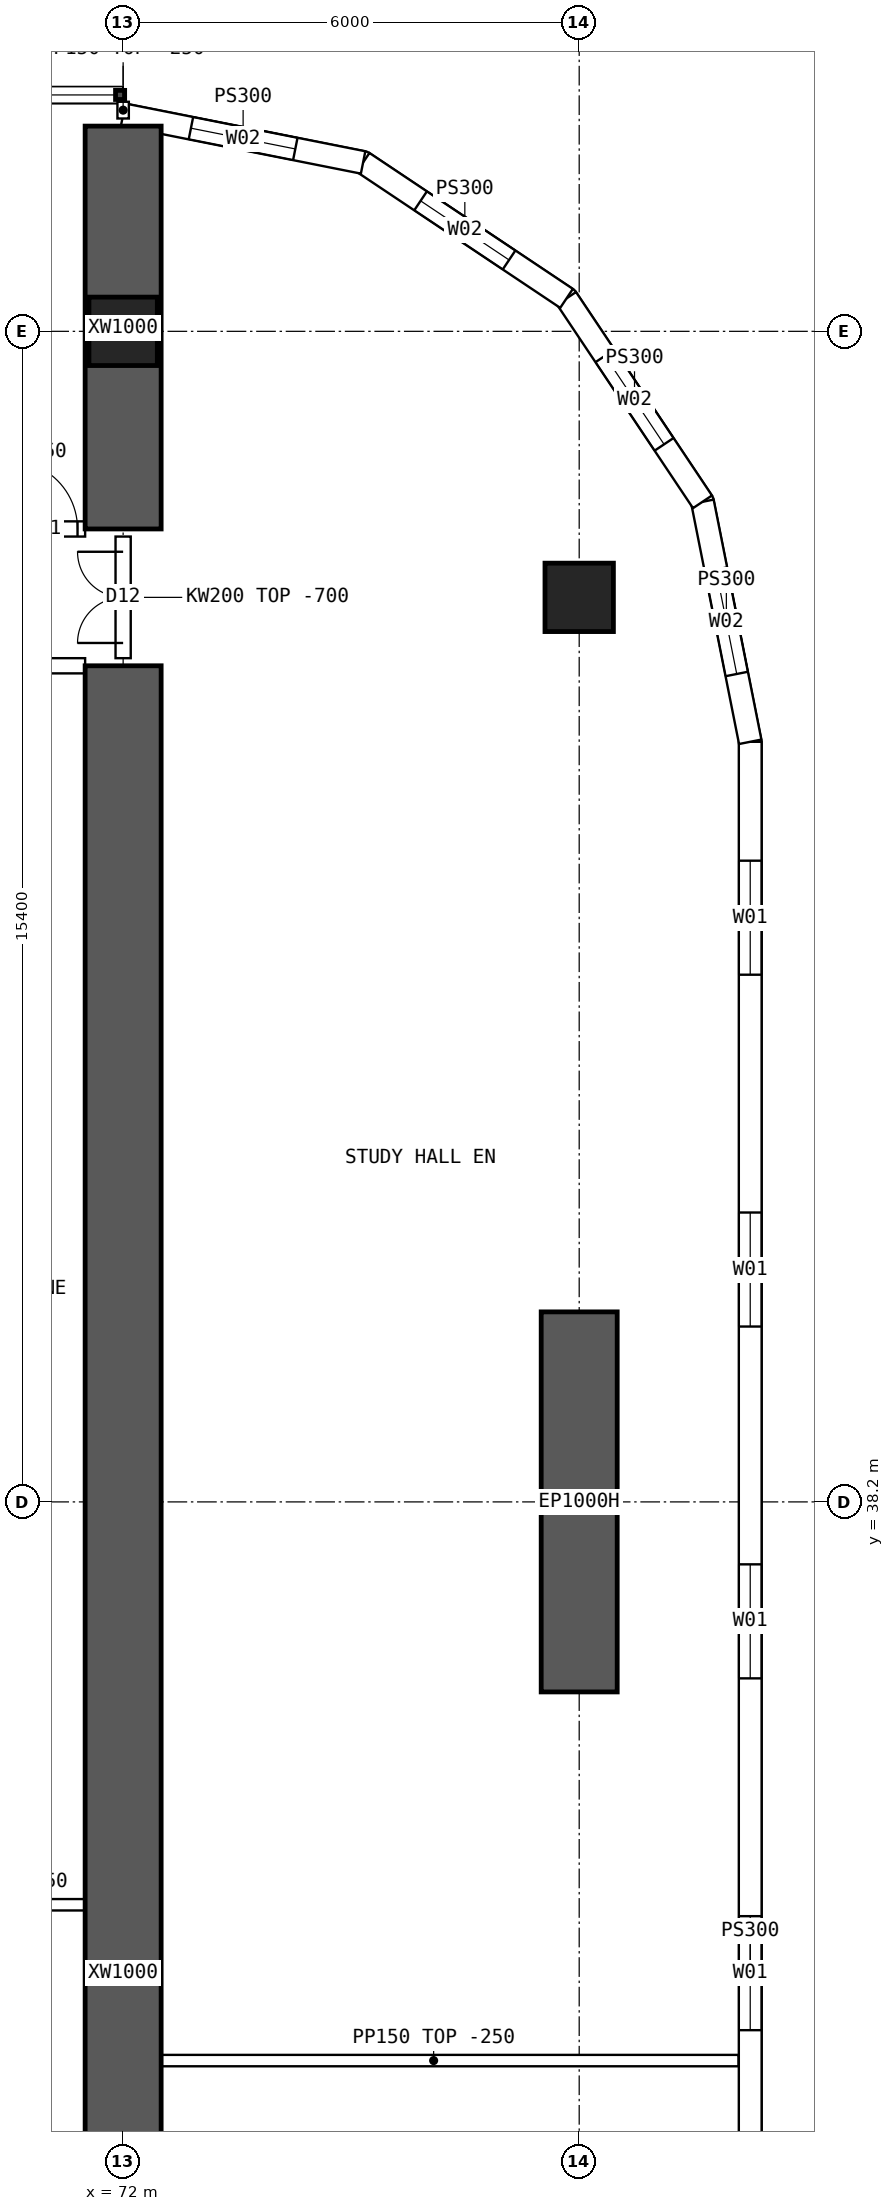
"""IFC4 building model, lengths in metres.
Left out: names, types, materials, properties, quantities, classifications, styles, units other than length and angle.
Written with IfcOpenShell. Run it as: python <this file> out.ifc"""

import sys

from ifc_helpers import new_model, si_unit, direction, frame, frame_2d, origin, origin_2d, place, context, subcontext, project, spatial, polyline, rectangle, hollow_rectangle, outline, extrude, element, fill, save


model = new_model("IFC4")
c1 = context("Model", 3, precision=1e-05, world=origin(), true_north=direction((0.0, 1.0)))
c2 = subcontext(c1, "Body", "Model", "MODEL_VIEW")
j1 = project(units=[si_unit("LENGTHUNIT", "METRE"), si_unit("PLANEANGLEUNIT", "RADIAN")], contexts=[c1])
p1 = place(None, origin())
s1 = spatial("IfcSite", under=j1, at=p1, CompositionType="ELEMENT")
p2 = place(p1, origin())
s2 = spatial("IfcBuilding", under=s1, at=p2, CompositionType="ELEMENT")
p3 = place(p2, frame((0.0, 0.0, 31.45)))
s3 = spatial("IfcBuildingStorey", under=s2, at=p3, CompositionType="ELEMENT", Elevation=31.45)
for number, where, z_axis, x_axis in (
    (1, (72.0, 53.6, 0.0), (0.0, 0.0, 1.0), (1.0, 0.0, 0.0)),
    (2, (78.0, 50.1, 0.0), (0.0, 0.0, 1.0), (1.0, 0.0, 0.0)),
):
    element("IfcColumn", number, at=place(p3, frame(where, z_axis=z_axis, x_axis=x_axis)), inside=s3, PredefinedType="COLUMN", context=c2, shape_type="SweptSolid", body=[
        extrude(hollow_rectangle(XDim=0.9, YDim=0.9, WallThickness=0.09, at=origin_2d()), origin(), (0.0, 0.0, 1.0), 3.75),
    ])
p4 = place(p3, frame((78.0, 35.7, 0.0), z_axis=(0.0, 0.0, 1.0), x_axis=(0.0, 1.0, 0.0)))
e3 = element("IfcWall", 3, at=p4, inside=s3, PredefinedType="SHEAR", context=c2, shape_type="SweptSolid", body=[
    extrude(rectangle(XDim=5.0, YDim=1.0, at=frame_2d((2.5, 0.0))), origin(), (0.0, 0.0, 1.0), 3.75),
])
p5 = place(p3, frame((72.0, 51.0, 0.0), z_axis=(0.0, 0.0, 1.0), x_axis=(0.0, 1.0, 0.0)))
e4 = element("IfcWall", 4, at=p5, inside=s3, PredefinedType="SHEAR", context=c2, shape_type="SweptSolid", body=[
    extrude(rectangle(XDim=5.3, YDim=1.0, at=frame_2d((2.65, 0.0))), origin(), (0.0, 0.0, 1.0), 3.75),
])
p6 = place(p3, frame((72.0, 14.8, 0.0), z_axis=(0.0, 0.0, 1.0), x_axis=(0.0, 1.0, 0.0)))
e5 = element("IfcWall", 5, at=p6, inside=s3, PredefinedType="SHEAR", context=c2, shape_type="SweptSolid", body=[
    extrude(rectangle(XDim=34.4, YDim=1.0, at=frame_2d((17.2, 0.0))), origin(), (0.0, 0.0, 1.0), 3.75),
])
p7 = place(p3, frame((80.25, 15.8, 0.0), z_axis=(0.0, 0.0, 1.0), x_axis=(0.0, 1.0, 0.0)))
e6 = element("IfcWall", 6, at=p7, inside=s3, PredefinedType="SOLIDWALL", context=c2, shape_type="SweptSolid", body=[
    extrude(outline(polyline([(-0.015, -0.15), (32.415, -0.15), (32.385, 0.15), (0.015, 0.15), (-0.015, -0.15)])), origin(), (0.0, 0.0, 1.0), 3.5),
])
p8 = place(p7, frame((1.564, 0.0, 0.9)))
e7 = element("IfcOpeningElement", 7, at=p8, cuts=e6, PredefinedType="OPENING", context=c2, shape_type="SweptSolid", body=[
    extrude(rectangle(XDim=1.5, YDim=2.0, at=frame_2d((0.75, 1.0))), frame((0.0, 0.16, 0.0), z_axis=(0.0, -1.0, 0.0), x_axis=(1.0, 0.0, 0.0)), (0.0, 0.0, 1.0), 0.32),
])
p9 = place(p7, frame((6.193, 0.0, 0.9)))
e8 = element("IfcOpeningElement", 8, at=p9, cuts=e6, PredefinedType="OPENING", context=c2, shape_type="SweptSolid", body=[
    extrude(rectangle(XDim=1.5, YDim=2.0, at=frame_2d((0.75, 1.0))), frame((0.0, 0.16, 0.0), z_axis=(0.0, -1.0, 0.0), x_axis=(1.0, 0.0, 0.0)), (0.0, 0.0, 1.0), 0.32),
])
p10 = place(p7, frame((10.822, 0.0, 0.9)))
e9 = element("IfcOpeningElement", 9, at=p10, cuts=e6, PredefinedType="OPENING", context=c2, shape_type="SweptSolid", body=[
    extrude(rectangle(XDim=1.5, YDim=2.0, at=frame_2d((0.75, 1.0))), frame((0.0, 0.16, 0.0), z_axis=(0.0, -1.0, 0.0), x_axis=(1.0, 0.0, 0.0)), (0.0, 0.0, 1.0), 0.32),
])
p11 = place(p7, frame((15.45, 0.0, 0.9)))
e10 = element("IfcOpeningElement", 10, at=p11, cuts=e6, PredefinedType="OPENING", context=c2, shape_type="SweptSolid", body=[
    extrude(rectangle(XDim=1.5, YDim=2.0, at=frame_2d((0.75, 1.0))), frame((0.0, 0.16, 0.0), z_axis=(0.0, -1.0, 0.0), x_axis=(1.0, 0.0, 0.0)), (0.0, 0.0, 1.0), 0.32),
])
p12 = place(p7, frame((20.079, 0.0, 0.9)))
e11 = element("IfcOpeningElement", 11, at=p12, cuts=e6, PredefinedType="OPENING", context=c2, shape_type="SweptSolid", body=[
    extrude(rectangle(XDim=1.5, YDim=2.0, at=frame_2d((0.75, 1.0))), frame((0.0, 0.16, 0.0), z_axis=(0.0, -1.0, 0.0), x_axis=(1.0, 0.0, 0.0)), (0.0, 0.0, 1.0), 0.32),
])
p13 = place(p7, frame((24.707, 0.0, 0.9)))
e12 = element("IfcOpeningElement", 12, at=p13, cuts=e6, PredefinedType="OPENING", context=c2, shape_type="SweptSolid", body=[
    extrude(rectangle(XDim=1.5, YDim=2.0, at=frame_2d((0.75, 1.0))), frame((0.0, 0.16, 0.0), z_axis=(0.0, -1.0, 0.0), x_axis=(1.0, 0.0, 0.0)), (0.0, 0.0, 1.0), 0.32),
])
p14 = place(p7, frame((29.336, 0.0, 0.9)))
e13 = element("IfcOpeningElement", 13, at=p14, cuts=e6, PredefinedType="OPENING", context=c2, shape_type="SweptSolid", body=[
    extrude(rectangle(XDim=1.5, YDim=2.0, at=frame_2d((0.75, 1.0))), frame((0.0, 0.16, 0.0), z_axis=(0.0, -1.0, 0.0), x_axis=(1.0, 0.0, 0.0)), (0.0, 0.0, 1.0), 0.32),
])
p15 = place(p3, frame((80.25, 48.2, 0.0), z_axis=(0.0, 0.0, 1.0), x_axis=(-0.195065901187, 0.980790137692, 0.0)))
e14 = element("IfcWall", 14, at=p15, inside=s3, PredefinedType="SOLIDWALL", context=c2, shape_type="SweptSolid", body=[
    extrude(outline(polyline([(-0.015, -0.15), (3.249, -0.15), (3.189, 0.15), (0.015, 0.15), (-0.015, -0.15)])), origin(), (0.0, 0.0, 1.0), 3.5),
])
p16 = place(p15, frame((0.909, 0.0, 0.9)))
e15 = element("IfcOpeningElement", 15, at=p16, cuts=e14, PredefinedType="OPENING", context=c2, shape_type="SweptSolid", body=[
    extrude(rectangle(XDim=1.4, YDim=1.8, at=frame_2d((0.7, 0.9))), frame((0.0, 0.16, 0.0), z_axis=(0.0, -1.0, 0.0), x_axis=(1.0, 0.0, 0.0)), (0.0, 0.0, 1.0), 0.32),
])
p17 = place(p3, frame((79.622, 51.357, 0.0), z_axis=(0.0, 0.0, 1.0), x_axis=(-0.555609954424, 0.831443069936, 0.0)))
e16 = element("IfcWall", 16, at=p17, inside=s3, PredefinedType="SOLIDWALL", context=c2, shape_type="SweptSolid", body=[
    extrude(outline(polyline([(-0.03, -0.15), (3.249, -0.15), (3.189, 0.15), (0.03, 0.15), (-0.03, -0.15)])), origin(), (0.0, 0.0, 1.0), 3.5),
])
p18 = place(p17, frame((0.909, 0.0, 0.9)))
e17 = element("IfcOpeningElement", 17, at=p18, cuts=e16, PredefinedType="OPENING", context=c2, shape_type="SweptSolid", body=[
    extrude(rectangle(XDim=1.4, YDim=1.8, at=frame_2d((0.7, 0.9))), frame((0.0, 0.16, 0.0), z_axis=(0.0, -1.0, 0.0), x_axis=(1.0, 0.0, 0.0)), (0.0, 0.0, 1.0), 0.32),
])
p19 = place(p3, frame((77.833, 54.034, 0.0), z_axis=(0.0, 0.0, 1.0), x_axis=(-0.831478105043, 0.555557522525, 0.0)))
e18 = element("IfcWall", 18, at=p19, inside=s3, PredefinedType="SOLIDWALL", context=c2, shape_type="SweptSolid", body=[
    extrude(outline(polyline([(-0.03, -0.15), (3.249, -0.15), (3.189, 0.15), (0.03, 0.15), (-0.03, -0.15)])), origin(), (0.0, 0.0, 1.0), 3.5),
])
p20 = place(p19, frame((0.909, 0.0, 0.9)))
e19 = element("IfcOpeningElement", 19, at=p20, cuts=e18, PredefinedType="OPENING", context=c2, shape_type="SweptSolid", body=[
    extrude(rectangle(XDim=1.4, YDim=1.8, at=frame_2d((0.7, 0.9))), frame((0.0, 0.16, 0.0), z_axis=(0.0, -1.0, 0.0), x_axis=(1.0, 0.0, 0.0)), (0.0, 0.0, 1.0), 0.32),
])
p21 = place(p3, frame((75.157, 55.822, 0.0), z_axis=(0.0, 0.0, 1.0), x_axis=(-0.980787251524, 0.195080412259, 0.0)))
e20 = element("IfcWall", 20, at=p21, inside=s3, PredefinedType="SOLIDWALL", context=c2, shape_type="SweptSolid", body=[
    extrude(outline(polyline([(-0.03, -0.15), (3.249, -0.15), (3.189, 0.15), (0.03, 0.15), (-0.03, -0.15)])), origin(), (0.0, 0.0, 1.0), 3.5),
])
p22 = place(p21, frame((0.909, 0.0, 0.9)))
e21 = element("IfcOpeningElement", 21, at=p22, cuts=e20, PredefinedType="OPENING", context=c2, shape_type="SweptSolid", body=[
    extrude(rectangle(XDim=1.4, YDim=1.8, at=frame_2d((0.7, 0.9))), frame((0.0, 0.16, 0.0), z_axis=(0.0, -1.0, 0.0), x_axis=(1.0, 0.0, 0.0)), (0.0, 0.0, 1.0), 0.32),
])
p23 = place(p3, frame((66.5, 51.0, 0.0), z_axis=(0.0, 0.0, 1.0), x_axis=(1.0, 0.0, 0.0)))
e22 = element("IfcWall", 22, at=p23, inside=s3, PredefinedType="SOLIDWALL", context=c2, shape_type="SweptSolid", body=[
    extrude(outline(polyline([(0.0, 0.0), (5.0, 0.0), (5.0, 3.1), (0.0, 3.1), (0.0, 0.0)])), frame((0.0, 0.1, 0.0), z_axis=(0.0, -1.0, 0.0), x_axis=(1.0, 0.0, 0.0)), (0.0, 0.0, 1.0), 0.2),
])
p24 = place(p23, frame((0.1, 0.0, 0.0)))
e23 = element("IfcOpeningElement", 23, at=p24, cuts=e22, PredefinedType="OPENING", context=c2, shape_type="SweptSolid", body=[
    extrude(rectangle(XDim=0.9, YDim=2.1, at=frame_2d((0.45, 1.05))), frame((0.0, 0.11, 0.0), z_axis=(0.0, -1.0, 0.0), x_axis=(1.0, 0.0, 0.0)), (0.0, 0.0, 1.0), 0.22),
])
p25 = place(p23, frame((4.0, 0.0, 0.0)))
e24 = element("IfcOpeningElement", 24, at=p25, cuts=e22, PredefinedType="OPENING", context=c2, shape_type="SweptSolid", body=[
    extrude(rectangle(XDim=0.9, YDim=2.1, at=frame_2d((0.45, 1.05))), frame((0.0, 0.11, 0.0), z_axis=(0.0, -1.0, 0.0), x_axis=(1.0, 0.0, 0.0)), (0.0, 0.0, 1.0), 0.22),
])
p26 = place(p3, frame((66.5, 49.2, 0.0), z_axis=(0.0, 0.0, 1.0), x_axis=(1.0, 0.0, 0.0)))
e25 = element("IfcWall", 25, at=p26, inside=s3, PredefinedType="SOLIDWALL", context=c2, shape_type="SweptSolid", body=[
    extrude(rectangle(XDim=5.0, YDim=0.2, at=frame_2d((2.5, 0.0))), origin(), (0.0, 0.0, 1.0), 3.5),
])
p27 = place(p26, frame((0.2, 0.0, 0.0)))
e26 = element("IfcOpeningElement", 26, at=p27, cuts=e25, PredefinedType="OPENING", context=c2, shape_type="SweptSolid", body=[
    extrude(rectangle(XDim=1.6, YDim=2.1, at=frame_2d((0.8, 1.05))), frame((0.0, 0.11, 0.0), z_axis=(0.0, -1.0, 0.0), x_axis=(1.0, 0.0, 0.0)), (0.0, 0.0, 1.0), 0.22),
])
p28 = place(p3, frame((68.4, 32.9, 0.0), z_axis=(0.0, 0.0, 1.0), x_axis=(1.0, 0.0, 0.0)))
e27 = element("IfcWall", 27, at=p28, inside=s3, PredefinedType="PARTITIONING", context=c2, shape_type="SweptSolid", body=[
    extrude(rectangle(XDim=3.6, YDim=0.15, at=frame_2d((1.8, 0.0))), origin(), (0.0, 0.0, 1.0), 3.5),
])
p29 = place(p3, frame((72.075, 30.85, 0.0), z_axis=(0.0, 0.0, 1.0), x_axis=(1.0, 0.0, 0.0)))
e28 = element("IfcWall", 28, at=p29, inside=s3, PredefinedType="PARTITIONING", context=c2, shape_type="SweptSolid", body=[
    extrude(outline(polyline([(0.0, 0.0), (8.02, 0.0), (8.02, 3.5), (6.227, 3.5), (6.225, 3.05), (5.627, 3.05), (5.625, 3.5), (0.0, 3.5), (0.0, 0.0)])), frame((0.0, 0.075, 0.0), z_axis=(0.0, -1.0, 0.0), x_axis=(1.0, 0.0, 0.0)), (0.0, 0.0, 1.0), 0.15),
])
p30 = place(p3, frame((72.0, 49.3, 0.0), z_axis=(0.0, 0.0, 1.0), x_axis=(0.0, 1.0, 0.0)))
e29 = element("IfcWall", 29, at=p30, inside=s3, PredefinedType="SOLIDWALL", context=c2, shape_type="SweptSolid", body=[
    extrude(outline(polyline([(0.0, 0.0), (1.6, 0.0), (1.6, 3.05), (0.0, 3.05), (0.0, 0.0)])), frame((0.0, 0.1, 0.0), z_axis=(0.0, -1.0, 0.0), x_axis=(1.0, 0.0, 0.0)), (0.0, 0.0, 1.0), 0.2),
])
p31 = place(p30, frame((0.2, 0.0, 0.0)))
e30 = element("IfcOpeningElement", 30, at=p31, cuts=e29, PredefinedType="OPENING", context=c2, shape_type="SweptSolid", body=[
    extrude(rectangle(XDim=1.2, YDim=2.1, at=frame_2d((0.6, 1.05))), frame((0.0, 0.11, 0.0), z_axis=(0.0, -1.0, 0.0), x_axis=(1.0, 0.0, 0.0)), (0.0, 0.0, 1.0), 0.22),
])
p32 = place(p3, frame((72.0, 56.4, 0.0), z_axis=(0.0, 0.0, 1.0), x_axis=(0.0, 1.0, 0.0)))
e31 = element("IfcWall", 31, at=p32, inside=s3, PredefinedType="PARTITIONING", context=c2, shape_type="SweptSolid", body=[
    extrude(rectangle(XDim=0.22, YDim=0.15, at=frame_2d((0.11, 0.0))), origin(), (0.0, 0.0, 1.0), 3.5),
])
p33 = place(p11, origin())
e32 = element("IfcWindow", 32, at=p33, inside=s3, PartitioningType="SINGLE_PANEL", PredefinedType="WINDOW", context=c2, shape_type="SweptSolid", body=[
    extrude(rectangle(XDim=1.5, YDim=2.0, at=frame_2d((0.75, 1.0))), frame((0.0, 0.03, 0.0), z_axis=(0.0, -1.0, 0.0), x_axis=(1.0, 0.0, 0.0)), (0.0, 0.0, 1.0), 0.06),
])
fill(e10, e32)
p34 = place(p12, origin())
e33 = element("IfcWindow", 33, at=p34, inside=s3, PartitioningType="SINGLE_PANEL", PredefinedType="WINDOW", context=c2, shape_type="SweptSolid", body=[
    extrude(rectangle(XDim=1.5, YDim=2.0, at=frame_2d((0.75, 1.0))), frame((0.0, 0.03, 0.0), z_axis=(0.0, -1.0, 0.0), x_axis=(1.0, 0.0, 0.0)), (0.0, 0.0, 1.0), 0.06),
])
fill(e11, e33)
p35 = place(p13, origin())
e34 = element("IfcWindow", 34, at=p35, inside=s3, PartitioningType="SINGLE_PANEL", PredefinedType="WINDOW", context=c2, shape_type="SweptSolid", body=[
    extrude(rectangle(XDim=1.5, YDim=2.0, at=frame_2d((0.75, 1.0))), frame((0.0, 0.03, 0.0), z_axis=(0.0, -1.0, 0.0), x_axis=(1.0, 0.0, 0.0)), (0.0, 0.0, 1.0), 0.06),
])
fill(e12, e34)
p36 = place(p14, origin())
e35 = element("IfcWindow", 35, at=p36, inside=s3, PartitioningType="SINGLE_PANEL", PredefinedType="WINDOW", context=c2, shape_type="SweptSolid", body=[
    extrude(rectangle(XDim=1.5, YDim=2.0, at=frame_2d((0.75, 1.0))), frame((0.0, 0.03, 0.0), z_axis=(0.0, -1.0, 0.0), x_axis=(1.0, 0.0, 0.0)), (0.0, 0.0, 1.0), 0.06),
])
fill(e13, e35)
p37 = place(p16, origin())
e36 = element("IfcWindow", 36, at=p37, inside=s3, PartitioningType="SINGLE_PANEL", PredefinedType="WINDOW", context=c2, shape_type="SweptSolid", body=[
    extrude(rectangle(XDim=1.4, YDim=1.8, at=frame_2d((0.7, 0.9))), frame((0.0, 0.03, 0.0), z_axis=(0.0, -1.0, 0.0), x_axis=(1.0, 0.0, 0.0)), (0.0, 0.0, 1.0), 0.06),
])
fill(e15, e36)
p38 = place(p18, origin())
e37 = element("IfcWindow", 37, at=p38, inside=s3, PartitioningType="SINGLE_PANEL", PredefinedType="WINDOW", context=c2, shape_type="SweptSolid", body=[
    extrude(rectangle(XDim=1.4, YDim=1.8, at=frame_2d((0.7, 0.9))), frame((0.0, 0.03, 0.0), z_axis=(0.0, -1.0, 0.0), x_axis=(1.0, 0.0, 0.0)), (0.0, 0.0, 1.0), 0.06),
])
fill(e17, e37)
p39 = place(p20, origin())
e38 = element("IfcWindow", 38, at=p39, inside=s3, PartitioningType="SINGLE_PANEL", PredefinedType="WINDOW", context=c2, shape_type="SweptSolid", body=[
    extrude(rectangle(XDim=1.4, YDim=1.8, at=frame_2d((0.7, 0.9))), frame((0.0, 0.03, 0.0), z_axis=(0.0, -1.0, 0.0), x_axis=(1.0, 0.0, 0.0)), (0.0, 0.0, 1.0), 0.06),
])
fill(e19, e38)
p40 = place(p22, origin())
e39 = element("IfcWindow", 39, at=p40, inside=s3, PartitioningType="SINGLE_PANEL", PredefinedType="WINDOW", context=c2, shape_type="SweptSolid", body=[
    extrude(rectangle(XDim=1.4, YDim=1.8, at=frame_2d((0.7, 0.9))), frame((0.0, 0.03, 0.0), z_axis=(0.0, -1.0, 0.0), x_axis=(1.0, 0.0, 0.0)), (0.0, 0.0, 1.0), 0.06),
])
fill(e21, e39)
p41 = place(p25, origin())
e40 = element("IfcDoor", 40, at=p41, inside=s3, OperationType="SINGLE_SWING_LEFT", PredefinedType="DOOR", context=c2, shape_type="SweptSolid", body=[
    extrude(rectangle(XDim=0.9, YDim=2.1, at=frame_2d((0.45, 1.05))), frame((0.0, 0.025, 0.0), z_axis=(0.0, -1.0, 0.0), x_axis=(1.0, 0.0, 0.0)), (0.0, 0.0, 1.0), 0.05),
])
fill(e24, e40)
p42 = place(p31, origin())
e41 = element("IfcDoor", 41, at=p42, inside=s3, OperationType="DOUBLE_DOOR_SINGLE_SWING", PredefinedType="DOOR", context=c2, shape_type="SweptSolid", body=[
    extrude(rectangle(XDim=1.2, YDim=2.1, at=frame_2d((0.6, 1.05))), frame((0.0, 0.025, 0.0), z_axis=(0.0, -1.0, 0.0), x_axis=(1.0, 0.0, 0.0)), (0.0, 0.0, 1.0), 0.05),
])
fill(e30, e41)
save(model, sys.argv[1])
